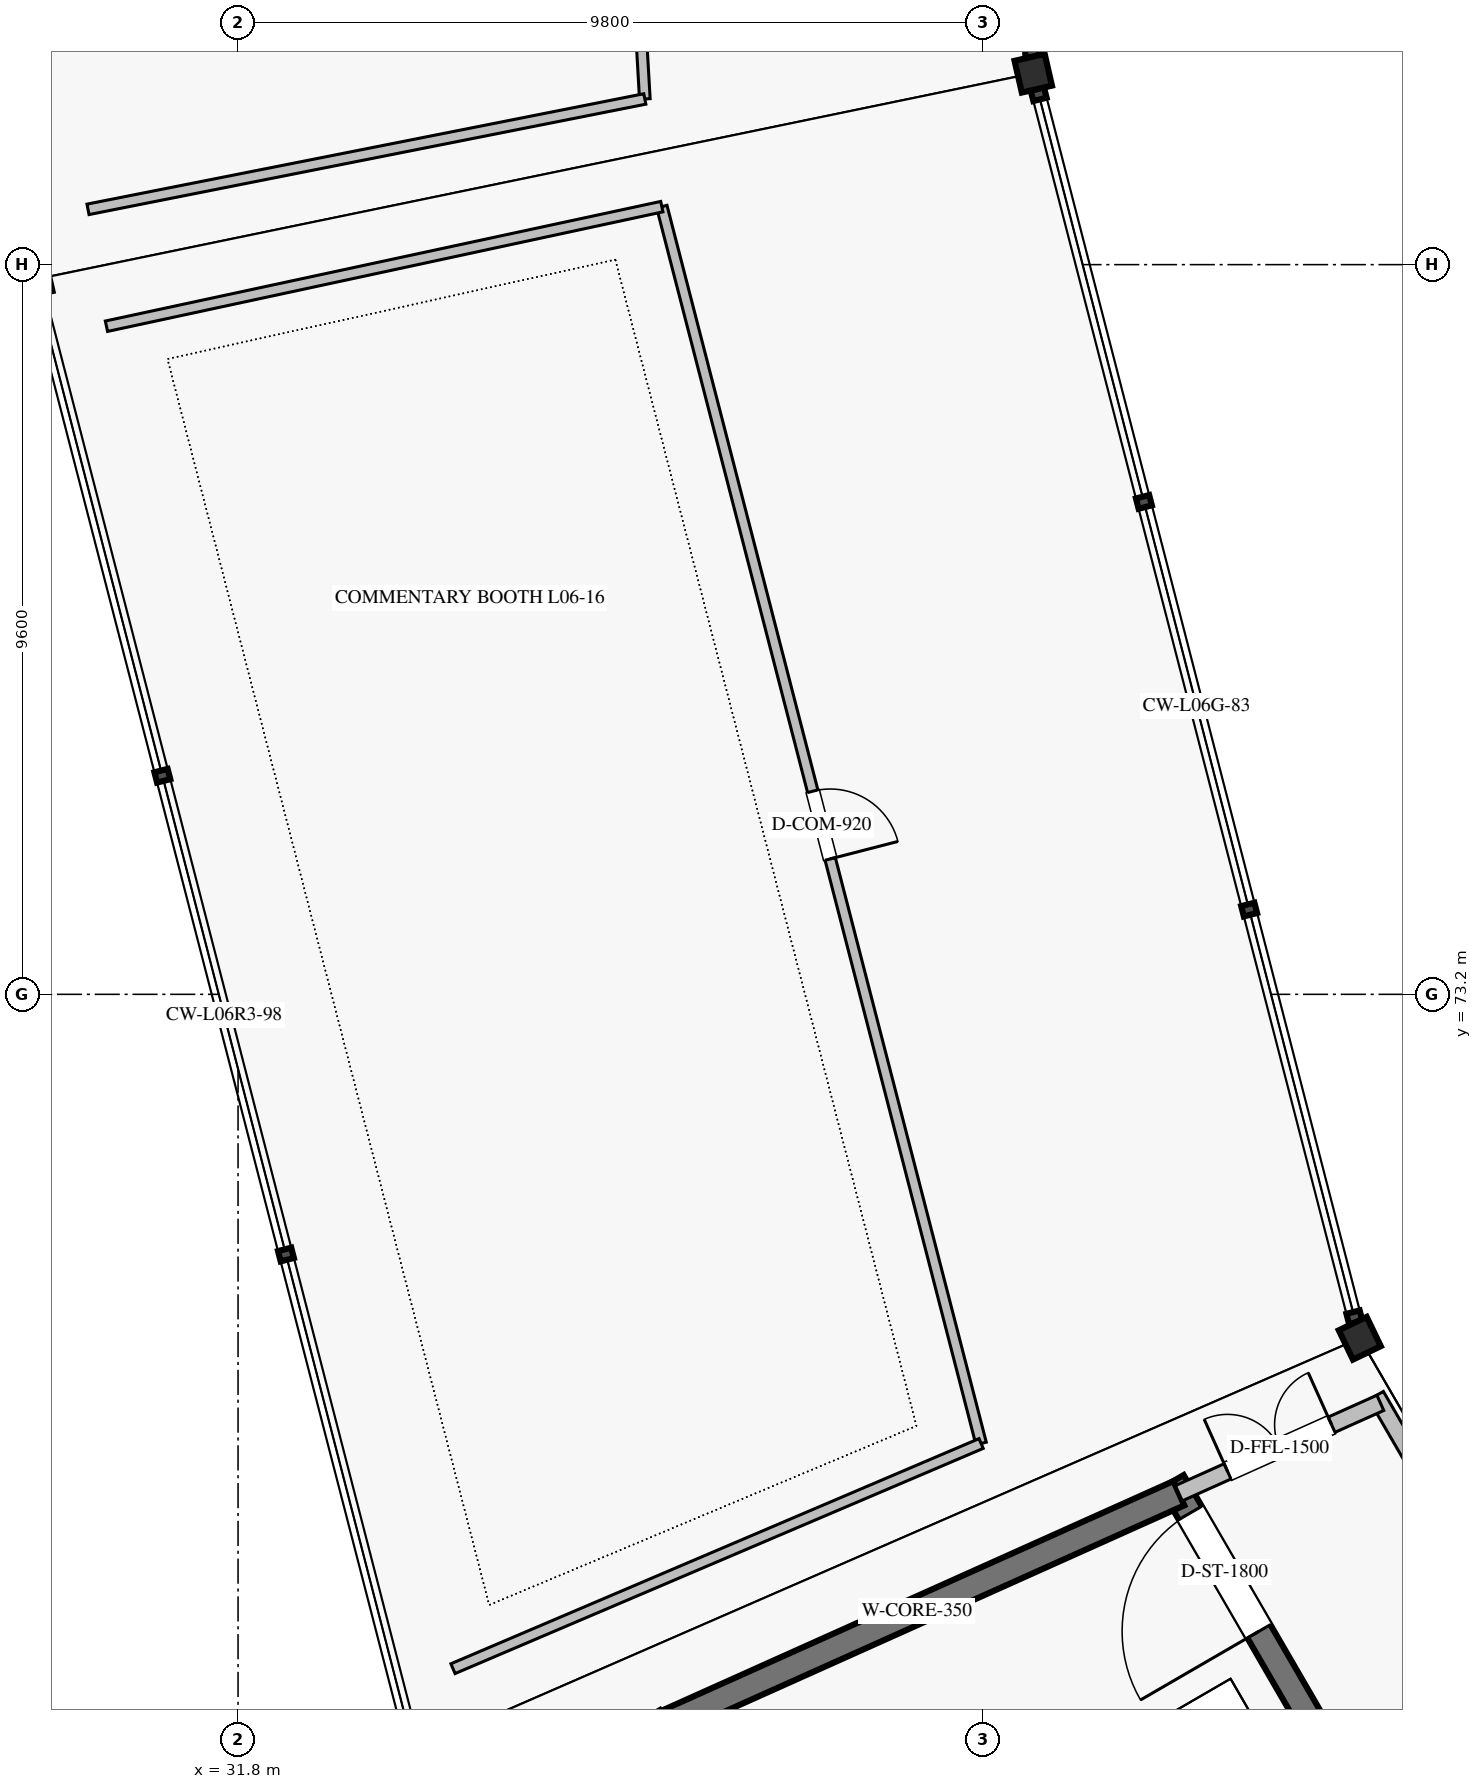
"""IFC4 building model, lengths in metres.
Left out: names, types, materials, properties, quantities, classifications, styles, units other than length and angle.
Written with IfcOpenShell. Run it as: python <this file> out.ifc"""

import sys

from ifc_helpers import new_model, si_unit, direction, frame, frame_2d, origin, origin_2d, place, context, subcontext, project, spatial, rectangle, hollow_rectangle, i_section, extrude, element, fill, save


model = new_model("IFC4")
c1 = context("Model", 3, precision=1e-05, world=origin(), true_north=direction((0.0, 1.0)))
c2 = subcontext(c1, "Body", "Model", "MODEL_VIEW")
j1 = project(units=[si_unit("LENGTHUNIT", "METRE"), si_unit("PLANEANGLEUNIT", "RADIAN")], contexts=[c1])
p1 = place(None, origin())
s1 = spatial("IfcSite", under=j1, at=p1, CompositionType="ELEMENT")
p2 = place(p1, origin())
s2 = spatial("IfcBuilding", under=s1, at=p2, CompositionType="ELEMENT")
p3 = place(p2, frame((0.0, 0.0, 31.28)))
s3 = spatial("IfcBuildingStorey", under=s2, at=p3, CompositionType="ELEMENT", Elevation=31.28)
for number, where, z_axis, x_axis in (
    (1, (42.262, 85.318, 0.0), (0.0, 0.0, 1.0), (-0.975, -0.223, 0.0)),
    (2, (46.559, 68.675, 0.0), (0.0, 0.0, 1.0), (-0.901, -0.434, 0.0)),
):
    element("IfcColumn", number, at=place(p3, frame(where, z_axis=z_axis, x_axis=x_axis)), inside=s3, PredefinedType="COLUMN", context=c2, shape_type="SweptSolid", body=[
        extrude(i_section(OverallWidth=0.407, OverallDepth=0.428, WebThickness=0.02, FlangeThickness=0.035, FilletRadius=0.013, at=origin_2d()), origin(), (0.0, 0.0, 1.0), 5.44),
    ])
p4 = place(p3, frame((29.119, 82.602, 0.0), z_axis=(0.0, 0.0, 1.0), x_axis=(-0.974927912182, -0.222520933954, 0.0)))
e3 = element("IfcColumn", 3, at=p4, inside=s3, PredefinedType="COLUMN", context=c2, shape_type="SweptSolid", body=[
    extrude(hollow_rectangle(XDim=0.4, YDim=0.4, WallThickness=0.019, at=origin_2d()), origin(), (0.0, 0.0, 1.0), 5.44),
])
p5 = place(p3, frame((44.09, 66.788, 0.0), z_axis=(0.0, 0.0, 1.0), x_axis=(0.501628624814, -0.865083072755, 0.0)))
e4 = element("IfcWall", 4, at=p5, inside=s3, PredefinedType="SHEAR", context=c2, shape_type="SweptSolid", body=[
    extrude(rectangle(XDim=11.435, YDim=0.35, at=frame_2d((5.718, 0.0))), origin(), (0.0, 0.0, 1.0), 5.16),
])
p6 = place(p5, frame((0.475, 0.0, 0.0)))
e5 = element("IfcOpeningElement", 5, at=p6, cuts=e4, PredefinedType="OPENING", context=c2, shape_type="SweptSolid", body=[
    extrude(rectangle(XDim=1.8, YDim=2.2, at=frame_2d((0.9, 1.1))), frame((0.0, 0.185, 0.0), z_axis=(0.0, -1.0, 0.0), x_axis=(1.0, 0.0, 0.0)), (0.0, 0.0, 1.0), 0.37),
])
p7 = place(p3, frame((44.178, 66.636, 0.0), z_axis=(0.0, 0.0, 1.0), x_axis=(-0.912385324524, -0.409332407212, 0.0)))
e6 = element("IfcWall", 6, at=p7, inside=s3, PredefinedType="SHEAR", context=c2, shape_type="SweptSolid", body=[
    extrude(rectangle(XDim=7.554, YDim=0.35, at=frame_2d((3.777, 0.0))), origin(), (0.0, 0.0, 1.0), 5.16),
])
p8 = place(p3, frame((46.774, 67.921, 0.0), z_axis=(0.0, 0.0, 1.0), x_axis=(0.501612626242, -0.865092349518, 0.0)))
e7 = element("IfcWall", 7, at=p8, inside=s3, PredefinedType="SOLIDWALL", context=c2, shape_type="SweptSolid", body=[
    extrude(rectangle(XDim=16.11, YDim=0.22, at=frame_2d((8.055, 0.0))), origin(), (0.0, 0.0, 1.0), 5.16),
])
p9 = place(p3, frame((46.829, 67.826, 0.0), z_axis=(0.0, 0.0, 1.0), x_axis=(-0.912378422162, -0.409347791949, 0.0)))
e8 = element("IfcWall", 8, at=p9, inside=s3, PredefinedType="SOLIDWALL", context=c2, shape_type="SweptSolid", body=[
    extrude(rectangle(XDim=2.906, YDim=0.22, at=frame_2d((1.453, 0.0))), origin(), (0.0, 0.0, 1.0), 5.16),
])
p10 = place(p9, frame((0.703, 0.0, 0.0)))
e9 = element("IfcOpeningElement", 9, at=p10, cuts=e8, PredefinedType="OPENING", context=c2, shape_type="SweptSolid", body=[
    extrude(rectangle(XDim=1.5, YDim=2.2, at=frame_2d((0.75, 1.1))), frame((0.0, 0.12, 0.0), z_axis=(0.0, -1.0, 0.0), x_axis=(1.0, 0.0, 0.0)), (0.0, 0.0, 1.0), 0.24),
])
p11 = place(p3, frame((36.211, 101.291, 0.0), z_axis=(0.0, 0.0, 1.0), x_axis=(0.057605127437, -0.998339445927, 0.0)))
e10 = element("IfcWall", 10, at=p11, inside=s3, PredefinedType="PARTITIONING", context=c2, shape_type="SweptSolid", body=[
    extrude(rectangle(XDim=16.338, YDim=0.14, at=frame_2d((8.169, 0.0))), origin(), (0.0, 0.0, 1.0), 4.48),
])
p12 = place(p11, frame((7.594, 0.0, 0.0)))
e11 = element("IfcOpeningElement", 11, at=p12, cuts=e10, PredefinedType="OPENING", context=c2, shape_type="SweptSolid", body=[
    extrude(rectangle(XDim=1.15, YDim=2.25, at=frame_2d((0.575, 1.125))), frame((0.0, 0.08, 0.0), z_axis=(0.0, -1.0, 0.0), x_axis=(1.0, 0.0, 0.0)), (0.0, 0.0, 1.0), 0.16),
])
p13 = place(p3, frame((37.152, 84.98, 0.0), z_axis=(0.0, 0.0, 1.0), x_axis=(-0.980903700741, -0.194494035571, 0.0)))
e12 = element("IfcWall", 12, at=p13, inside=s3, PredefinedType="PARTITIONING", context=c2, shape_type="SweptSolid", body=[
    extrude(rectangle(XDim=7.469, YDim=0.14, at=frame_2d((3.734, 0.0))), origin(), (0.0, 0.0, 1.0), 4.48),
])
p14 = place(p3, frame((37.375, 83.563, 0.0), z_axis=(0.0, 0.0, 1.0), x_axis=(0.249966328054, -0.968254529986, 0.0)))
e13 = element("IfcWall", 13, at=p14, inside=s3, PredefinedType="PARTITIONING", context=c2, shape_type="SweptSolid", body=[
    extrude(rectangle(XDim=16.806, YDim=0.14, at=frame_2d((8.403, 0.0))), origin(), (0.0, 0.0, 1.0), 4.48),
])
p15 = place(p14, frame((7.943, 0.0, 0.0)))
e14 = element("IfcOpeningElement", 14, at=p15, cuts=e13, PredefinedType="OPENING", context=c2, shape_type="SweptSolid", body=[
    extrude(rectangle(XDim=0.92, YDim=2.15, at=frame_2d((0.46, 1.075))), frame((0.0, 0.08, 0.0), z_axis=(0.0, -1.0, 0.0), x_axis=(1.0, 0.0, 0.0)), (0.0, 0.0, 1.0), 0.16),
])
p16 = place(p3, frame((37.375, 83.563, 0.0), z_axis=(0.0, 0.0, 1.0), x_axis=(-0.977591606225, -0.210510454464, 0.0)))
e15 = element("IfcWall", 15, at=p16, inside=s3, PredefinedType="PARTITIONING", context=c2, shape_type="SweptSolid", body=[
    extrude(rectangle(XDim=7.475, YDim=0.14, at=frame_2d((3.737, 0.0))), origin(), (0.0, 0.0, 1.0), 4.48),
])
p17 = place(p3, frame((41.576, 67.291, 0.0), z_axis=(0.0, 0.0, 1.0), x_axis=(-0.919898990597, -0.39215538642, 0.0)))
e16 = element("IfcWall", 16, at=p17, inside=s3, PredefinedType="PARTITIONING", context=c2, shape_type="SweptSolid", body=[
    extrude(rectangle(XDim=7.553, YDim=0.14, at=frame_2d((3.777, 0.0))), origin(), (0.0, 0.0, 1.0), 4.48),
])
p18 = place(p6, frame((1.8, 0.0, 0.0), z_axis=(0.0, 0.0, 1.0), x_axis=(-1.0, 0.0, 0.0)))
e17 = element("IfcDoor", 17, at=p18, inside=s3, OperationType="SINGLE_SWING_LEFT", PredefinedType="DOOR", context=c2, shape_type="SweptSolid", body=[
    extrude(rectangle(XDim=1.8, YDim=2.2, at=frame_2d((0.9, 1.1))), frame((0.0, 0.025, 0.0), z_axis=(0.0, -1.0, 0.0), x_axis=(1.0, 0.0, 0.0)), (0.0, 0.0, 1.0), 0.05),
])
fill(e5, e17)
p19 = place(p10, frame((1.5, 0.0, 0.0), z_axis=(0.0, 0.0, 1.0), x_axis=(-1.0, 0.0, 0.0)))
e18 = element("IfcDoor", 18, at=p19, inside=s3, OperationType="DOUBLE_DOOR_SINGLE_SWING", PredefinedType="DOOR", context=c2, shape_type="SweptSolid", body=[
    extrude(rectangle(XDim=1.5, YDim=2.2, at=frame_2d((0.75, 1.1))), frame((0.0, 0.025, 0.0), z_axis=(0.0, -1.0, 0.0), x_axis=(1.0, 0.0, 0.0)), (0.0, 0.0, 1.0), 0.05),
])
fill(e9, e18)
p20 = place(p15, origin())
e19 = element("IfcDoor", 19, at=p20, inside=s3, OperationType="SINGLE_SWING_RIGHT", PredefinedType="DOOR", context=c2, shape_type="SweptSolid", body=[
    extrude(rectangle(XDim=0.92, YDim=2.15, at=frame_2d((0.46, 1.075))), frame((0.0, 0.025, 0.0), z_axis=(0.0, -1.0, 0.0), x_axis=(1.0, 0.0, 0.0)), (0.0, 0.0, 1.0), 0.05),
])
fill(e14, e19)
save(model, sys.argv[1])
